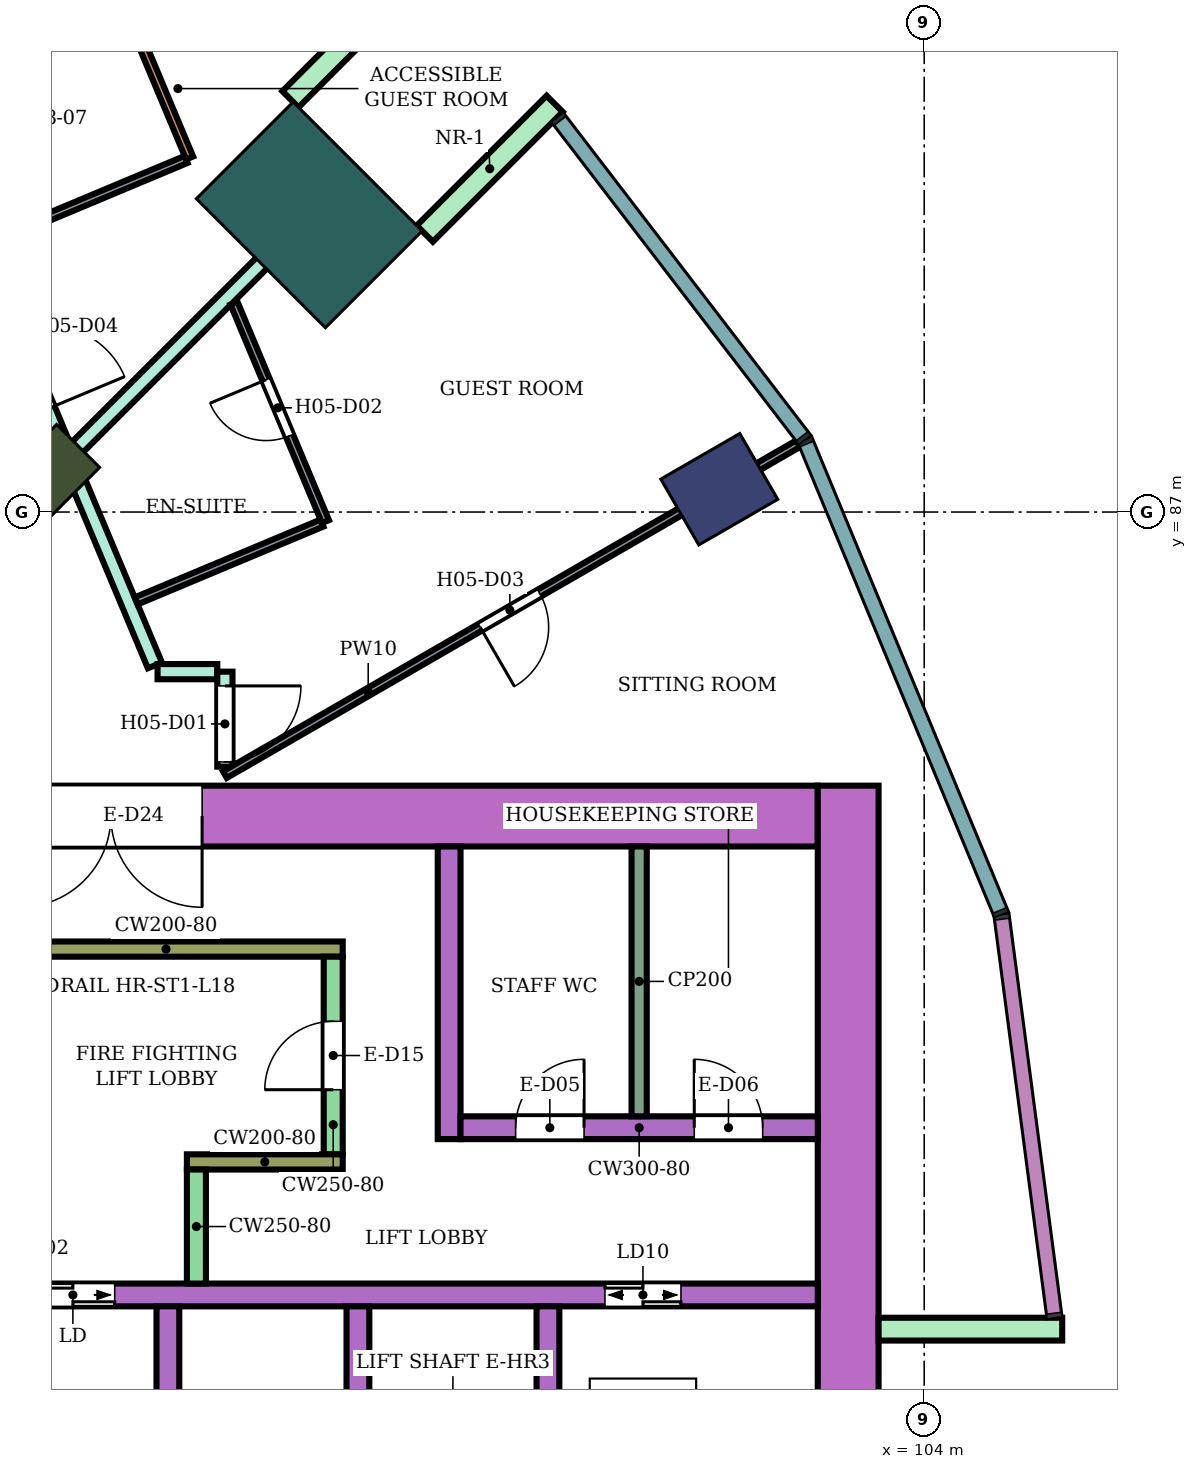
"""IFC4 building model, lengths in metres.
Left out: names, types, materials, properties, quantities, classifications, styles, units other than length and angle.
Written with IfcOpenShell. Run it as: python <this file> out.ifc"""

import sys

from ifc_helpers import new_model, si_unit, direction, frame, frame_2d, origin, origin_2d, place, context, subcontext, project, spatial, rectangle, extrude, element, fill, save


model = new_model("IFC4")
c1 = context("Model", 3, precision=1e-05, world=origin(), true_north=direction((0.0, 1.0)))
c2 = subcontext(c1, "Body", "Model", "MODEL_VIEW")
j1 = project(units=[si_unit("LENGTHUNIT", "METRE"), si_unit("PLANEANGLEUNIT", "RADIAN")], contexts=[c1])
p1 = place(None, origin())
s1 = spatial("IfcSite", under=j1, at=p1, CompositionType="ELEMENT")
p2 = place(p1, origin())
s2 = spatial("IfcBuilding", under=s1, at=p2, CompositionType="ELEMENT")
p3 = place(p2, frame((0.0, 0.0, 82.4)))
s3 = spatial("IfcBuildingStorey", under=s2, at=p3, CompositionType="ELEMENT", Elevation=82.4)
p4 = place(p3, frame((101.304, 87.3, 0.0), z_axis=(0.0, 0.0, 1.0), x_axis=(0.866025403784, 0.5, 0.0)))
e1 = element("IfcColumn", 1, at=p4, inside=s3, PredefinedType="COLUMN", context=c2, shape_type="SweptSolid", body=[
    extrude(rectangle(XDim=1.2, YDim=1.0, at=origin_2d()), origin(), (0.0, 0.0, 1.0), 3.8),
])
p5 = place(p3, frame((92.445, 87.445, 0.0), z_axis=(0.0, 0.0, 1.0), x_axis=(0.707106781187, 0.707106781187, 0.0)))
e2 = element("IfcColumn", 2, at=p5, inside=s3, PredefinedType="COLUMN", context=c2, shape_type="SweptSolid", body=[
    extrude(rectangle(XDim=1.2, YDim=0.8, at=origin_2d()), origin(), (0.0, 0.0, 1.0), 3.8),
])
p6 = place(p3, frame((95.91, 90.91, 0.0), z_axis=(0.0, 0.0, 1.0), x_axis=(0.707106781187, 0.707106781187, 0.0)))
e3 = element("IfcColumn", 3, at=p6, inside=s3, PredefinedType="COLUMN", context=c2, shape_type="SweptSolid", body=[
    extrude(rectangle(XDim=1.8, YDim=2.4, at=origin_2d()), origin(), (0.0, 0.0, 1.0), 3.8),
])
p7 = place(p3, frame((87.9, 83.0, 0.0), z_axis=(0.0, 0.0, 1.0), x_axis=(1.0, 0.0, 0.0)))
e4 = element("IfcWall", 4, at=p7, inside=s3, PredefinedType="SHEAR", context=c2, shape_type="SweptSolid", body=[
    extrude(rectangle(XDim=14.7, YDim=0.8, at=frame_2d((7.35, 0.0))), origin(), (0.0, 0.0, 1.0), 3.48),
])
p8 = place(p7, frame((4.2, 0.0, 0.0)))
e5 = element("IfcOpeningElement", 5, at=p8, cuts=e4, PredefinedType="OPENING", context=c2, shape_type="SweptSolid", body=[
    extrude(rectangle(XDim=2.4, YDim=2.4, at=frame_2d((1.2, 1.2))), frame((0.0, 0.41, 0.0), z_axis=(0.0, -1.0, 0.0), x_axis=(1.0, 0.0, 0.0)), (0.0, 0.0, 1.0), 0.82),
])
p9 = place(p3, frame((103.0, 66.6, 0.0), z_axis=(0.0, 0.0, 1.0), x_axis=(0.0, 1.0, 0.0)))
e6 = element("IfcWall", 6, at=p9, inside=s3, PredefinedType="SHEAR", context=c2, shape_type="SweptSolid", body=[
    extrude(rectangle(XDim=16.8, YDim=0.8, at=frame_2d((8.4, 0.0))), origin(), (0.0, 0.0, 1.0), 3.48),
])
p10 = place(p3, frame((91.7, 76.7, 0.0), z_axis=(0.0, 0.0, 1.0), x_axis=(1.0, 0.0, 0.0)))
e7 = element("IfcWall", 7, at=p10, inside=s3, PredefinedType="SHEAR", context=c2, shape_type="SweptSolid", body=[
    extrude(rectangle(XDim=10.9, YDim=0.3, at=frame_2d((5.45, 0.0))), origin(), (0.0, 0.0, 1.0), 3.48),
])
p11 = place(p10, frame((0.55, 0.0, 0.0)))
e8 = element("IfcOpeningElement", 8, at=p11, cuts=e7, PredefinedType="OPENING", context=c2, shape_type="SweptSolid", body=[
    extrude(rectangle(XDim=1.1, YDim=2.1, at=frame_2d((0.55, 1.05))), frame((0.0, 0.16, 0.0), z_axis=(0.0, -1.0, 0.0), x_axis=(1.0, 0.0, 0.0)), (0.0, 0.0, 1.0), 0.32),
])
p12 = place(p10, frame((8.1, 0.0, 0.0)))
e9 = element("IfcOpeningElement", 9, at=p12, cuts=e7, PredefinedType="OPENING", context=c2, shape_type="SweptSolid", body=[
    extrude(rectangle(XDim=1.0, YDim=2.1, at=frame_2d((0.5, 1.05))), frame((0.0, 0.16, 0.0), z_axis=(0.0, -1.0, 0.0), x_axis=(1.0, 0.0, 0.0)), (0.0, 0.0, 1.0), 0.32),
])
for number, where, z_axis, x_axis in (
    (10, (94.05, 74.0, 0.0), (0.0, 0.0, 1.0), (0.0, 1.0, 0.0)),
    (11, (96.55, 74.0, 0.0), (0.0, 0.0, 1.0), (0.0, 1.0, 0.0)),
    (12, (99.05, 74.0, 0.0), (0.0, 0.0, 1.0), (0.0, 1.0, 0.0)),
):
    element("IfcWall", number, at=place(p3, frame(where, z_axis=z_axis, x_axis=x_axis)), inside=s3, PredefinedType="SHEAR", context=c2, shape_type="SweptSolid", body=[
        extrude(rectangle(XDim=2.55, YDim=0.3, at=frame_2d((1.275, 0.0))), origin(), (0.0, 0.0, 1.0), 3.48),
    ])
p13 = place(p3, frame((91.7, 81.25, 0.0), z_axis=(0.0, 0.0, 1.0), x_axis=(1.0, 0.0, 0.0)))
e13 = element("IfcWall", 13, at=p13, inside=s3, PredefinedType="SHEAR", context=c2, shape_type="SweptSolid", body=[
    extrude(rectangle(XDim=4.65, YDim=0.2, at=frame_2d((2.325, 0.0))), origin(), (0.0, 0.0, 1.0), 3.48),
])
p14 = place(p3, frame((96.225, 78.55, 0.0), z_axis=(0.0, 0.0, 1.0), x_axis=(0.0, 1.0, 0.0)))
e14 = element("IfcWall", 14, at=p14, inside=s3, PredefinedType="SHEAR", context=c2, shape_type="SweptSolid", body=[
    extrude(rectangle(XDim=2.6, YDim=0.25, at=frame_2d((1.3, 0.0))), origin(), (0.0, 0.0, 1.0), 3.48),
])
p15 = place(p14, frame((0.85, 0.0, 0.0)))
e15 = element("IfcOpeningElement", 15, at=p15, cuts=e14, PredefinedType="OPENING", context=c2, shape_type="SweptSolid", body=[
    extrude(rectangle(XDim=0.9, YDim=2.1, at=frame_2d((0.45, 1.05))), frame((0.0, 0.135, 0.0), z_axis=(0.0, -1.0, 0.0), x_axis=(1.0, 0.0, 0.0)), (0.0, 0.0, 1.0), 0.27),
])
p16 = place(p3, frame((94.3, 78.45, 0.0), z_axis=(0.0, 0.0, 1.0), x_axis=(1.0, 0.0, 0.0)))
e16 = element("IfcWall", 16, at=p16, inside=s3, PredefinedType="SHEAR", context=c2, shape_type="SweptSolid", body=[
    extrude(rectangle(XDim=2.05, YDim=0.2, at=frame_2d((1.025, 0.0))), origin(), (0.0, 0.0, 1.0), 3.48),
])
p17 = place(p3, frame((94.425, 76.85, 0.0), z_axis=(0.0, 0.0, 1.0), x_axis=(0.0, 1.0, 0.0)))
e17 = element("IfcWall", 17, at=p17, inside=s3, PredefinedType="SHEAR", context=c2, shape_type="SweptSolid", body=[
    extrude(rectangle(XDim=1.5, YDim=0.25, at=frame_2d((0.75, 0.0))), origin(), (0.0, 0.0, 1.0), 3.48),
])
p18 = place(p3, frame((97.75, 78.75, 0.0), z_axis=(0.0, 0.0, 1.0), x_axis=(0.0, 1.0, 0.0)))
e18 = element("IfcWall", 18, at=p18, inside=s3, PredefinedType="SHEAR", context=c2, shape_type="SweptSolid", body=[
    extrude(rectangle(XDim=3.85, YDim=0.3, at=frame_2d((1.925, 0.0))), origin(), (0.0, 0.0, 1.0), 3.48),
])
p19 = place(p3, frame((97.9, 78.9, 0.0), z_axis=(0.0, 0.0, 1.0), x_axis=(1.0, 0.0, 0.0)))
e19 = element("IfcWall", 19, at=p19, inside=s3, PredefinedType="SHEAR", context=c2, shape_type="SweptSolid", body=[
    extrude(rectangle(XDim=4.7, YDim=0.3, at=frame_2d((2.35, 0.0))), origin(), (0.0, 0.0, 1.0), 3.48),
])
p20 = place(p19, frame((0.725, 0.0, 0.0)))
e20 = element("IfcOpeningElement", 20, at=p20, cuts=e19, PredefinedType="OPENING", context=c2, shape_type="SweptSolid", body=[
    extrude(rectangle(XDim=0.9, YDim=2.1, at=frame_2d((0.45, 1.05))), frame((0.0, 0.16, 0.0), z_axis=(0.0, -1.0, 0.0), x_axis=(1.0, 0.0, 0.0)), (0.0, 0.0, 1.0), 0.32),
])
p21 = place(p19, frame((3.075, 0.0, 0.0)))
e21 = element("IfcOpeningElement", 21, at=p21, cuts=e19, PredefinedType="OPENING", context=c2, shape_type="SweptSolid", body=[
    extrude(rectangle(XDim=0.9, YDim=2.1, at=frame_2d((0.45, 1.05))), frame((0.0, 0.16, 0.0), z_axis=(0.0, -1.0, 0.0), x_axis=(1.0, 0.0, 0.0)), (0.0, 0.0, 1.0), 0.32),
])
for number, where, z_axis, x_axis in (
    (22, (103.4, 76.25, 0.0), (0.0, 0.0, 1.0), (1.0, 0.0, 0.0)),
    (23, (97.43, 90.662, 0.0), (0.0, 0.0, 1.0), (0.707, 0.707, 0.0)),
    (24, (95.662, 92.43, 0.0), (0.0, 0.0, 1.0), (0.707, 0.707, 0.0)),
):
    element("IfcWall", number, at=place(p3, frame(where, z_axis=z_axis, x_axis=x_axis)), inside=s3, PredefinedType="NOTDEFINED", context=c2, shape_type="SweptSolid", body=[
        extrude(rectangle(XDim=2.416, YDim=0.3, at=frame_2d((1.208, 0.0))), origin(), (0.0, 0.0, 1.0), 3.8),
    ])
p22 = place(p3, frame((90.327, 92.878, 0.0), z_axis=(0.0, 0.0, 1.0), x_axis=(0.50022153717, 0.865897461453, 0.0)))
e25 = element("IfcWall", 25, at=p22, inside=s3, PredefinedType="PARTITIONING", context=c2, shape_type="SweptSolid", body=[
    extrude(rectangle(XDim=5.152, YDim=0.2, at=frame_2d((2.576, 0.0))), origin(), (0.0, 0.0, 1.0), 3.35),
])
p23 = place(p3, frame((90.604, 92.805, 0.0), z_axis=(0.0, 0.0, 1.0), x_axis=(0.386209298583, -0.922411176042, 0.0)))
e26 = element("IfcWall", 26, at=p23, inside=s3, PredefinedType="PARTITIONING", context=c2, shape_type="SweptSolid", body=[
    extrude(rectangle(XDim=8.48, YDim=0.2, at=frame_2d((4.24, 0.0))), origin(), (0.0, 0.0, 1.0), 3.35),
])
p24 = place(p23, frame((3.723, 0.0, 0.0)))
e27 = element("IfcOpeningElement", 27, at=p24, cuts=e26, PredefinedType="OPENING", context=c2, shape_type="SweptSolid", body=[
    extrude(rectangle(XDim=1.1, YDim=2.1, at=frame_2d((0.55, 1.05))), frame((0.0, 0.11, 0.0), z_axis=(0.0, -1.0, 0.0), x_axis=(1.0, 0.0, 0.0)), (0.0, 0.0, 1.0), 0.22),
])
p25 = place(p3, frame((92.832, 87.824, 0.0), z_axis=(0.0, 0.0, 1.0), x_axis=(0.707251566381, 0.70696196634, 0.0)))
e28 = element("IfcWall", 28, at=p25, inside=s3, PredefinedType="PARTITIONING", context=c2, shape_type="SweptSolid", body=[
    extrude(rectangle(XDim=5.058, YDim=0.2, at=frame_2d((2.529, 0.0))), origin(), (0.0, 0.0, 1.0), 3.35),
])
p26 = place(p3, frame((93.914, 84.9, 0.0), z_axis=(0.0, 0.0, 1.0), x_axis=(1.0, 0.0, 0.0)))
e29 = element("IfcWall", 29, at=p26, inside=s3, PredefinedType="PARTITIONING", context=c2, shape_type="SweptSolid", body=[
    extrude(rectangle(XDim=0.786, YDim=0.2, at=frame_2d((0.393, 0.0))), origin(), (0.0, 0.0, 1.0), 3.35),
])
p27 = place(p3, frame((94.8, 83.65, 0.0), z_axis=(0.0, 0.0, 1.0), x_axis=(0.0, 1.0, 0.0)))
e30 = element("IfcWall", 30, at=p27, inside=s3, PredefinedType="PARTITIONING", context=c2, shape_type="SweptSolid", body=[
    extrude(rectangle(XDim=1.25, YDim=0.2, at=frame_2d((0.625, 0.0))), origin(), (0.0, 0.0, 1.0), 3.35),
])
p28 = place(p27, frame((0.062, 0.0, 0.0)))
e31 = element("IfcOpeningElement", 31, at=p28, cuts=e30, PredefinedType="OPENING", context=c2, shape_type="SweptSolid", body=[
    extrude(rectangle(XDim=1.0, YDim=2.1, at=frame_2d((0.5, 1.05))), frame((0.0, 0.11, 0.0), z_axis=(0.0, -1.0, 0.0), x_axis=(1.0, 0.0, 0.0)), (0.0, 0.0, 1.0), 0.22),
])
p29 = place(p3, frame((91.661, 90.538, 0.0), z_axis=(0.0, 0.0, 1.0), x_axis=(0.922352973625, 0.386348278169, 0.0)))
e32 = element("IfcWall", 32, at=p29, inside=s3, PredefinedType="PARTITIONING", context=c2, shape_type="SweptSolid", body=[
    extrude(rectangle(XDim=2.85, YDim=0.1, at=frame_2d((1.425, 0.0))), origin(), (0.0, 0.0, 1.0), 3.35),
])
p30 = place(p3, frame((92.414, 96.246, 0.0), z_axis=(0.0, 0.0, 1.0), x_axis=(0.386353683992, -0.922350709256, 0.0)))
e33 = element("IfcWall", 33, at=p30, inside=s3, PredefinedType="PARTITIONING", context=c2, shape_type="SweptSolid", body=[
    extrude(rectangle(XDim=4.974, YDim=0.1, at=frame_2d((2.487, 0.0))), origin(), (0.0, 0.0, 1.0), 2.58),
])
p31 = place(p30, frame((1.957, 0.0, 0.0)))
e34 = element("IfcOpeningElement", 34, at=p31, cuts=e33, PredefinedType="OPENING", context=c2, shape_type="SweptSolid", body=[
    extrude(rectangle(XDim=0.9, YDim=2.1, at=frame_2d((0.45, 1.05))), frame((0.0, 0.06, 0.0), z_axis=(0.0, -1.0, 0.0), x_axis=(1.0, 0.0, 0.0)), (0.0, 0.0, 1.0), 0.12),
])
p32 = place(p3, frame((93.633, 85.831, 0.0), z_axis=(0.0, 0.0, 1.0), x_axis=(0.922344808264, 0.38636777126, 0.0)))
e35 = element("IfcWall", 35, at=p32, inside=s3, PredefinedType="PARTITIONING", context=c2, shape_type="SweptSolid", body=[
    extrude(rectangle(XDim=2.65, YDim=0.1, at=frame_2d((1.325, 0.0))), origin(), (0.0, 0.0, 1.0), 3.35),
])
p33 = place(p3, frame((94.8, 83.545, 0.0), z_axis=(0.0, 0.0, 1.0), x_axis=(0.86602264145, 0.500004784474, 0.0)))
e36 = element("IfcWall", 36, at=p33, inside=s3, PredefinedType="PARTITIONING", context=c2, shape_type="SweptSolid", body=[
    extrude(rectangle(XDim=8.708, YDim=0.1, at=frame_2d((4.354, 0.0))), origin(), (0.0, 0.0, 1.0), 3.35),
])
p34 = place(p33, frame((3.879, 0.0, 0.0)))
e37 = element("IfcOpeningElement", 37, at=p34, cuts=e36, PredefinedType="OPENING", context=c2, shape_type="SweptSolid", body=[
    extrude(rectangle(XDim=0.9, YDim=2.1, at=frame_2d((0.45, 1.05))), frame((0.0, 0.06, 0.0), z_axis=(0.0, -1.0, 0.0), x_axis=(1.0, 0.0, 0.0)), (0.0, 0.0, 1.0), 0.12),
])
p35 = place(p3, frame((94.919, 89.748, 0.0), z_axis=(0.0, 0.0, 1.0), x_axis=(0.38635048828, -0.922352047868, 0.0)))
e38 = element("IfcWall", 38, at=p35, inside=s3, PredefinedType="PARTITIONING", context=c2, shape_type="SweptSolid", body=[
    extrude(rectangle(XDim=3.116, YDim=0.1, at=frame_2d((1.558, 0.0))), origin(), (0.0, 0.0, 1.0), 3.35),
])
p36 = place(p35, frame((1.093, 0.0, 0.0)))
e39 = element("IfcOpeningElement", 39, at=p36, cuts=e38, PredefinedType="OPENING", context=c2, shape_type="SweptSolid", body=[
    extrude(rectangle(XDim=0.8, YDim=2.1, at=frame_2d((0.4, 1.05))), frame((0.0, 0.06, 0.0), z_axis=(0.0, -1.0, 0.0), x_axis=(1.0, 0.0, 0.0)), (0.0, 0.0, 1.0), 0.12),
])
p37 = place(p3, frame((100.25, 79.05, 0.0), z_axis=(0.0, 0.0, 1.0), x_axis=(0.0, 1.0, 0.0)))
e40 = element("IfcWall", 40, at=p37, inside=s3, PredefinedType="PARTITIONING", context=c2, shape_type="SweptSolid", body=[
    extrude(rectangle(XDim=3.55, YDim=0.2, at=frame_2d((1.775, 0.0))), origin(), (0.0, 0.0, 1.0), 3.48),
])
p38 = place(p28, frame((1.0, 0.0, 0.0), z_axis=(0.0, 0.0, 1.0), x_axis=(-1.0, 0.0, 0.0)))
e41 = element("IfcDoor", 41, at=p38, inside=s3, OperationType="SINGLE_SWING_LEFT", PredefinedType="DOOR", context=c2, shape_type="SweptSolid", body=[
    extrude(rectangle(XDim=1.0, YDim=2.1, at=frame_2d((0.5, 1.05))), frame((0.0, 0.025, 0.0), z_axis=(0.0, -1.0, 0.0), x_axis=(1.0, 0.0, 0.0)), (0.0, 0.0, 1.0), 0.05),
])
fill(e31, e41)
p39 = place(p36, frame((0.8, 0.0, 0.0), z_axis=(0.0, 0.0, 1.0), x_axis=(-1.0, 0.0, 0.0)))
e42 = element("IfcDoor", 42, at=p39, inside=s3, OperationType="SINGLE_SWING_RIGHT", PredefinedType="DOOR", context=c2, shape_type="SweptSolid", body=[
    extrude(rectangle(XDim=0.8, YDim=2.1, at=frame_2d((0.4, 1.05))), frame((0.0, 0.025, 0.0), z_axis=(0.0, -1.0, 0.0), x_axis=(1.0, 0.0, 0.0)), (0.0, 0.0, 1.0), 0.05),
])
fill(e39, e42)
p40 = place(p34, frame((0.9, 0.0, 0.0), z_axis=(0.0, 0.0, 1.0), x_axis=(-1.0, 0.0, 0.0)))
e43 = element("IfcDoor", 43, at=p40, inside=s3, OperationType="SINGLE_SWING_RIGHT", PredefinedType="DOOR", context=c2, shape_type="SweptSolid", body=[
    extrude(rectangle(XDim=0.9, YDim=2.1, at=frame_2d((0.45, 1.05))), frame((0.0, 0.025, 0.0), z_axis=(0.0, -1.0, 0.0), x_axis=(1.0, 0.0, 0.0)), (0.0, 0.0, 1.0), 0.05),
])
fill(e37, e43)
p41 = place(p11, origin())
e44 = element("IfcDoor", 44, at=p41, inside=s3, OperationType="DOUBLE_DOOR_SLIDING", PredefinedType="DOOR", context=c2, shape_type="SweptSolid", body=[
    extrude(rectangle(XDim=1.1, YDim=2.1, at=frame_2d((0.55, 1.05))), frame((0.0, 0.025, 0.0), z_axis=(0.0, -1.0, 0.0), x_axis=(1.0, 0.0, 0.0)), (0.0, 0.0, 1.0), 0.05),
])
fill(e8, e44)
p42 = place(p12, origin())
e45 = element("IfcDoor", 45, at=p42, inside=s3, OperationType="DOUBLE_DOOR_SLIDING", PredefinedType="DOOR", context=c2, shape_type="SweptSolid", body=[
    extrude(rectangle(XDim=1.0, YDim=2.1, at=frame_2d((0.5, 1.05))), frame((0.0, 0.025, 0.0), z_axis=(0.0, -1.0, 0.0), x_axis=(1.0, 0.0, 0.0)), (0.0, 0.0, 1.0), 0.05),
])
fill(e9, e45)
p43 = place(p15, origin())
e46 = element("IfcDoor", 46, at=p43, inside=s3, OperationType="SINGLE_SWING_LEFT", PredefinedType="DOOR", context=c2, shape_type="SweptSolid", body=[
    extrude(rectangle(XDim=0.9, YDim=2.1, at=frame_2d((0.45, 1.05))), frame((0.0, 0.025, 0.0), z_axis=(0.0, -1.0, 0.0), x_axis=(1.0, 0.0, 0.0)), (0.0, 0.0, 1.0), 0.05),
])
fill(e15, e46)
p44 = place(p20, origin())
e47 = element("IfcDoor", 47, at=p44, inside=s3, OperationType="SINGLE_SWING_RIGHT", PredefinedType="DOOR", context=c2, shape_type="SweptSolid", body=[
    extrude(rectangle(XDim=0.9, YDim=2.1, at=frame_2d((0.45, 1.05))), frame((0.0, 0.025, 0.0), z_axis=(0.0, -1.0, 0.0), x_axis=(1.0, 0.0, 0.0)), (0.0, 0.0, 1.0), 0.05),
])
fill(e20, e47)
p45 = place(p21, origin())
e48 = element("IfcDoor", 48, at=p45, inside=s3, OperationType="SINGLE_SWING_LEFT", PredefinedType="DOOR", context=c2, shape_type="SweptSolid", body=[
    extrude(rectangle(XDim=0.9, YDim=2.1, at=frame_2d((0.45, 1.05))), frame((0.0, 0.025, 0.0), z_axis=(0.0, -1.0, 0.0), x_axis=(1.0, 0.0, 0.0)), (0.0, 0.0, 1.0), 0.05),
])
fill(e21, e48)
p46 = place(p8, frame((2.4, 0.0, 0.0), z_axis=(0.0, 0.0, 1.0), x_axis=(-1.0, 0.0, 0.0)))
e49 = element("IfcDoor", 49, at=p46, inside=s3, OperationType="DOUBLE_DOOR_SINGLE_SWING", PredefinedType="DOOR", context=c2, shape_type="SweptSolid", body=[
    extrude(rectangle(XDim=2.4, YDim=2.4, at=frame_2d((1.2, 1.2))), frame((0.0, 0.025, 0.0), z_axis=(0.0, -1.0, 0.0), x_axis=(1.0, 0.0, 0.0)), (0.0, 0.0, 1.0), 0.05),
])
fill(e5, e49)
save(model, sys.argv[1])
